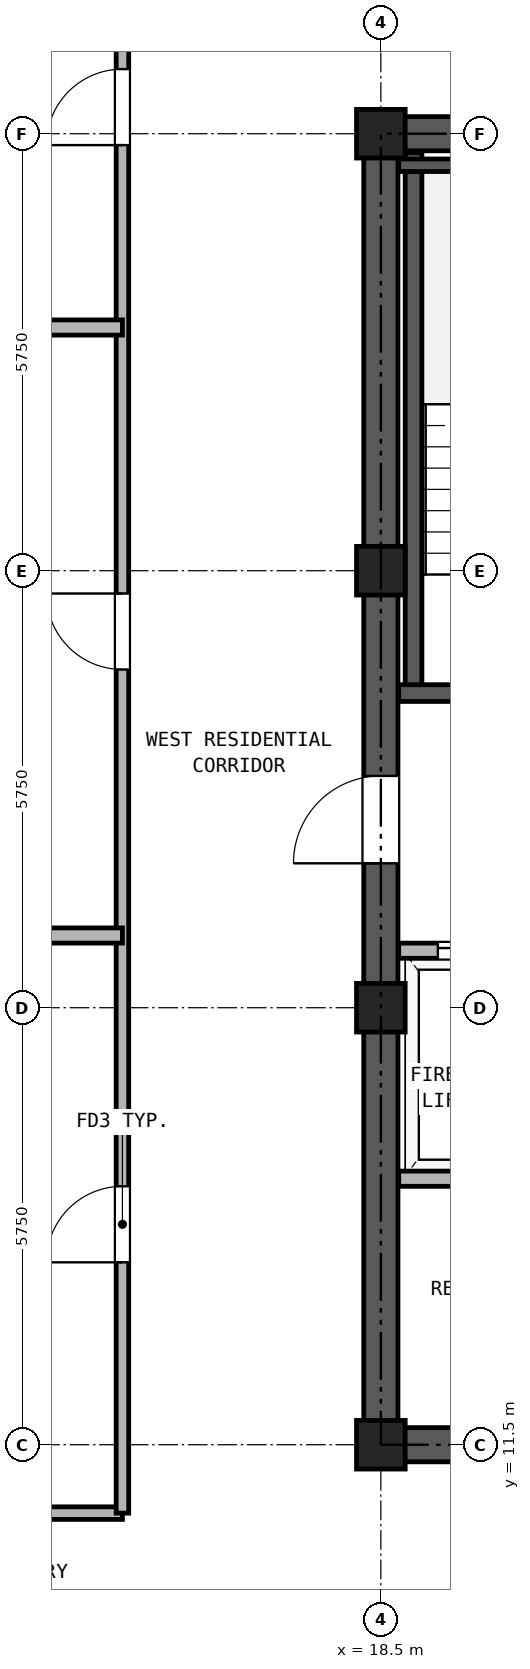
"""IFC4 building model, lengths in metres.
Left out: names, types, materials, properties, quantities, classifications, styles, units other than length and angle.
Written with IfcOpenShell. Run it as: python <this file> out.ifc"""

import sys

from ifc_helpers import new_model, si_unit, direction, frame, frame_2d, origin, origin_2d, place, context, subcontext, project, spatial, rectangle, hollow_rectangle, extrude, source, transform, mapped, element, fill, save


model = new_model("IFC4")
c1 = context("Model", 3, precision=1e-05, world=origin(), true_north=direction((0.0, 1.0)))
c2 = subcontext(c1, "Body", "Model", "MODEL_VIEW")
j1 = project(units=[si_unit("LENGTHUNIT", "METRE"), si_unit("PLANEANGLEUNIT", "RADIAN")], contexts=[c1])
p1 = place(None, origin())
s1 = spatial("IfcSite", under=j1, at=p1, CompositionType="ELEMENT")
p2 = place(p1, origin())
s2 = spatial("IfcBuilding", under=s1, at=p2, CompositionType="ELEMENT")
p3 = place(p2, frame((0.0, 0.0, 196.4)))
s3 = spatial("IfcBuildingStorey", under=s2, at=p3, CompositionType="ELEMENT", Elevation=196.4)
m1 = source(origin(), c2, "Body", "SweptSolid", [
    extrude(hollow_rectangle(XDim=0.64, YDim=0.64, WallThickness=0.035, at=origin_2d()), origin(), (0.0, 0.0, 1.0), 2.95),
])
for number, where, z_axis, x_axis in (
    (1, (18.5, 11.5, 0.0), (0.0, 0.0, 1.0), (1.0, 0.0, 0.0)),
    (2, (18.5, 17.25, 0.0), (0.0, 0.0, 1.0), (1.0, 0.0, 0.0)),
    (3, (18.5, 23.0, 0.0), (0.0, 0.0, 1.0), (1.0, 0.0, 0.0)),
    (4, (18.5, 28.75, 0.0), (0.0, 0.0, 1.0), (1.0, 0.0, 0.0)),
):
    element("IfcColumn", number, at=place(p3, frame(where, z_axis=z_axis, x_axis=x_axis)), inside=s3, PredefinedType="COLUMN", context=c2, shape_type="MappedRepresentation", body=[
        mapped(m1, transform((0.0, 0.0, 0.0), x_axis=(1.0, 0.0, 0.0), y_axis=(0.0, 1.0, 0.0), z_axis=(0.0, 0.0, 1.0), scale=1.0)),
    ])
p4 = place(p3, frame((18.275, 11.5, 0.0), z_axis=(0.0, 0.0, 1.0), x_axis=(1.0, 0.0, 0.0)))
e5 = element("IfcWall", 5, at=p4, inside=s3, PredefinedType="SHEAR", context=c2, shape_type="SweptSolid", body=[
    extrude(rectangle(XDim=10.45, YDim=0.45, at=frame_2d((5.225, 0.0))), origin(), (0.0, 0.0, 1.0), 2.95),
])
p5 = place(p4, frame((1.825, 0.0, 0.0)))
e6 = element("IfcOpeningElement", 6, at=p5, cuts=e5, PredefinedType="OPENING", context=c2, shape_type="SweptSolid", body=[
    extrude(rectangle(XDim=0.95, YDim=2.15, at=frame_2d((0.475, 1.075))), frame((0.0, 0.235, 0.0), z_axis=(0.0, -1.0, 0.0), x_axis=(1.0, 0.0, 0.0)), (0.0, 0.0, 1.0), 0.47),
])
p6 = place(p4, frame((5.325, 0.0, 0.0)))
e7 = element("IfcOpeningElement", 7, at=p6, cuts=e5, PredefinedType="OPENING", context=c2, shape_type="SweptSolid", body=[
    extrude(rectangle(XDim=0.95, YDim=2.15, at=frame_2d((0.475, 1.075))), frame((0.0, 0.235, 0.0), z_axis=(0.0, -1.0, 0.0), x_axis=(1.0, 0.0, 0.0)), (0.0, 0.0, 1.0), 0.47),
])
p7 = place(p4, frame((8.225, 0.0, 0.0)))
e8 = element("IfcOpeningElement", 8, at=p7, cuts=e5, PredefinedType="OPENING", context=c2, shape_type="SweptSolid", body=[
    extrude(rectangle(XDim=1.1, YDim=2.25, at=frame_2d((0.55, 1.125))), frame((0.0, 0.235, 0.0), z_axis=(0.0, -1.0, 0.0), x_axis=(1.0, 0.0, 0.0)), (0.0, 0.0, 1.0), 0.47),
])
p8 = place(p3, frame((18.275, 28.75, 0.0), z_axis=(0.0, 0.0, 1.0), x_axis=(1.0, 0.0, 0.0)))
e9 = element("IfcWall", 9, at=p8, inside=s3, PredefinedType="SHEAR", context=c2, shape_type="SweptSolid", body=[
    extrude(rectangle(XDim=10.45, YDim=0.45, at=frame_2d((5.225, 0.0))), origin(), (0.0, 0.0, 1.0), 2.95),
])
p9 = place(p8, frame((4.105, 0.0, 0.0)))
e10 = element("IfcOpeningElement", 10, at=p9, cuts=e9, PredefinedType="OPENING", context=c2, shape_type="SweptSolid", body=[
    extrude(rectangle(XDim=0.9, YDim=2.05, at=frame_2d((0.45, 1.025))), frame((0.0, 0.235, 0.0), z_axis=(0.0, -1.0, 0.0), x_axis=(1.0, 0.0, 0.0)), (0.0, 0.0, 1.0), 0.47),
])
p10 = place(p8, frame((5.645, 0.0, 0.0)))
e11 = element("IfcOpeningElement", 11, at=p10, cuts=e9, PredefinedType="OPENING", context=c2, shape_type="SweptSolid", body=[
    extrude(rectangle(XDim=0.9, YDim=2.05, at=frame_2d((0.45, 1.025))), frame((0.0, 0.235, 0.0), z_axis=(0.0, -1.0, 0.0), x_axis=(1.0, 0.0, 0.0)), (0.0, 0.0, 1.0), 0.47),
])
p11 = place(p3, frame((18.5, 11.725, 0.0), z_axis=(0.0, 0.0, 1.0), x_axis=(0.0, 1.0, 0.0)))
e12 = element("IfcWall", 12, at=p11, inside=s3, PredefinedType="SHEAR", context=c2, shape_type="SweptSolid", body=[
    extrude(rectangle(XDim=16.8, YDim=0.45, at=frame_2d((8.4, 0.0))), origin(), (0.0, 0.0, 1.0), 2.95),
])
p12 = place(p11, frame((7.425, 0.0, 0.0)))
e13 = element("IfcOpeningElement", 13, at=p12, cuts=e12, PredefinedType="OPENING", context=c2, shape_type="SweptSolid", body=[
    extrude(rectangle(XDim=1.15, YDim=2.2, at=frame_2d((0.575, 1.1))), frame((0.0, 0.235, 0.0), z_axis=(0.0, -1.0, 0.0), x_axis=(1.0, 0.0, 0.0)), (0.0, 0.0, 1.0), 0.47),
])
p13 = place(p3, frame((18.93, 21.39, 0.0), z_axis=(0.0, 0.0, 1.0), x_axis=(0.0, 1.0, 0.0)))
e14 = element("IfcWall", 14, at=p13, inside=s3, PredefinedType="SOLIDWALL", context=c2, shape_type="SweptSolid", body=[
    extrude(rectangle(XDim=7.11, YDim=0.22, at=frame_2d((3.555, 0.0))), origin(), (0.0, 0.0, 1.0), 2.95),
])
p14 = place(p3, frame((18.735, 28.335, 0.0), z_axis=(0.0, 0.0, 1.0), x_axis=(1.0, 0.0, 0.0)))
e15 = element("IfcWall", 15, at=p14, inside=s3, PredefinedType="PARTITIONING", context=c2, shape_type="SweptSolid", body=[
    extrude(rectangle(XDim=3.375, YDim=0.165, at=frame_2d((1.688, 0.0))), origin(), (0.0, 0.0, 1.0), 2.95),
])
p15 = place(p3, frame((18.735, 21.39, 0.0), z_axis=(0.0, 0.0, 1.0), x_axis=(1.0, 0.0, 0.0)))
e16 = element("IfcWall", 16, at=p15, inside=s3, PredefinedType="SOLIDWALL", context=c2, shape_type="SweptSolid", body=[
    extrude(rectangle(XDim=6.395, YDim=0.22, at=frame_2d((3.197, 0.0))), origin(), (0.0, 0.0, 1.0), 2.95),
])
p16 = place(p15, frame((1.115, 0.0, 0.0)))
e17 = element("IfcOpeningElement", 17, at=p16, cuts=e16, PredefinedType="OPENING", context=c2, shape_type="SweptSolid", body=[
    extrude(rectangle(XDim=1.15, YDim=2.2, at=frame_2d((0.575, 1.1))), frame((0.0, 0.12, 0.0), z_axis=(0.0, -1.0, 0.0), x_axis=(1.0, 0.0, 0.0)), (0.0, 0.0, 1.0), 0.24),
])
p17 = place(p15, frame((4.845, 0.0, 0.0)))
e18 = element("IfcOpeningElement", 18, at=p17, cuts=e16, PredefinedType="OPENING", context=c2, shape_type="SweptSolid", body=[
    extrude(rectangle(XDim=1.1, YDim=2.25, at=frame_2d((0.55, 1.125))), frame((0.0, 0.12, 0.0), z_axis=(0.0, -1.0, 0.0), x_axis=(1.0, 0.0, 0.0)), (0.0, 0.0, 1.0), 0.24),
])
p18 = place(p3, frame((18.735, 18.0, 0.0), z_axis=(0.0, 0.0, 1.0), x_axis=(1.0, 0.0, 0.0)))
e19 = element("IfcWall", 19, at=p18, inside=s3, PredefinedType="PARTITIONING", context=c2, shape_type="SweptSolid", body=[
    extrude(rectangle(XDim=9.53, YDim=0.2, at=frame_2d((4.765, 0.0))), origin(), (0.0, 0.0, 1.0), 2.95),
])
p19 = place(p18, frame((0.515, 0.0, 0.0)))
e20 = element("IfcOpeningElement", 20, at=p19, cuts=e19, PredefinedType="OPENING", context=c2, shape_type="SweptSolid", body=[
    extrude(rectangle(XDim=1.3, YDim=2.3, at=frame_2d((0.65, 1.15))), frame((0.0, 0.11, 0.0), z_axis=(0.0, -1.0, 0.0), x_axis=(1.0, 0.0, 0.0)), (0.0, 0.0, 1.0), 0.22),
])
p20 = place(p18, frame((2.615, 0.0, 0.0)))
e21 = element("IfcOpeningElement", 21, at=p20, cuts=e19, PredefinedType="OPENING", context=c2, shape_type="SweptSolid", body=[
    extrude(rectangle(XDim=1.3, YDim=2.3, at=frame_2d((0.65, 1.15))), frame((0.0, 0.11, 0.0), z_axis=(0.0, -1.0, 0.0), x_axis=(1.0, 0.0, 0.0)), (0.0, 0.0, 1.0), 0.22),
])
p21 = place(p18, frame((5.035, 0.0, 0.0)))
e22 = element("IfcOpeningElement", 22, at=p21, cuts=e19, PredefinedType="OPENING", context=c2, shape_type="SweptSolid", body=[
    extrude(rectangle(XDim=0.9, YDim=2.05, at=frame_2d((0.45, 1.025))), frame((0.0, 0.11, 0.0), z_axis=(0.0, -1.0, 0.0), x_axis=(1.0, 0.0, 0.0)), (0.0, 0.0, 1.0), 0.22),
])
p22 = place(p18, frame((8.165, 0.0, 0.0)))
e23 = element("IfcOpeningElement", 23, at=p22, cuts=e19, PredefinedType="OPENING", context=c2, shape_type="SweptSolid", body=[
    extrude(rectangle(XDim=0.9, YDim=2.05, at=frame_2d((0.45, 1.025))), frame((0.0, 0.11, 0.0), z_axis=(0.0, -1.0, 0.0), x_axis=(1.0, 0.0, 0.0)), (0.0, 0.0, 1.0), 0.22),
])
p23 = place(p3, frame((18.735, 15.0, 0.0), z_axis=(0.0, 0.0, 1.0), x_axis=(1.0, 0.0, 0.0)))
e24 = element("IfcWall", 24, at=p23, inside=s3, PredefinedType="PARTITIONING", context=c2, shape_type="SweptSolid", body=[
    extrude(rectangle(XDim=9.53, YDim=0.2, at=frame_2d((4.765, 0.0))), origin(), (0.0, 0.0, 1.0), 2.95),
])
p24 = place(p3, frame((7.6, 10.6, 0.0), z_axis=(0.0, 0.0, 1.0), x_axis=(1.0, 0.0, 0.0)))
e25 = element("IfcWall", 25, at=p24, inside=s3, PredefinedType="PARTITIONING", context=c2, shape_type="SweptSolid", body=[
    extrude(rectangle(XDim=7.5, YDim=0.165, at=frame_2d((3.75, 0.0))), origin(), (0.0, 0.0, 1.0), 2.95),
])
p25 = place(p3, frame((15.1, 10.6, 0.0), z_axis=(0.0, 0.0, 1.0), x_axis=(0.0, 1.0, 0.0)))
e26 = element("IfcWall", 26, at=p25, inside=s3, PredefinedType="PARTITIONING", context=c2, shape_type="SweptSolid", body=[
    extrude(rectangle(XDim=24.54, YDim=0.165, at=frame_2d((12.27, 0.0))), origin(), (0.0, 0.0, 1.0), 2.95),
])
p26 = place(p25, frame((3.3, 0.0, 0.0)))
e27 = element("IfcOpeningElement", 27, at=p26, cuts=e26, PredefinedType="OPENING", context=c2, shape_type="SweptSolid", body=[
    extrude(rectangle(XDim=1.0, YDim=2.15, at=frame_2d((0.5, 1.075))), frame((0.0, 0.093, 0.0), z_axis=(0.0, -1.0, 0.0), x_axis=(1.0, 0.0, 0.0)), (0.0, 0.0, 1.0), 0.185),
])
p27 = place(p25, frame((11.1, 0.0, 0.0)))
e28 = element("IfcOpeningElement", 28, at=p27, cuts=e26, PredefinedType="OPENING", context=c2, shape_type="SweptSolid", body=[
    extrude(rectangle(XDim=1.0, YDim=2.15, at=frame_2d((0.5, 1.075))), frame((0.0, 0.093, 0.0), z_axis=(0.0, -1.0, 0.0), x_axis=(1.0, 0.0, 0.0)), (0.0, 0.0, 1.0), 0.185),
])
p28 = place(p25, frame((18.0, 0.0, 0.0)))
e29 = element("IfcOpeningElement", 29, at=p28, cuts=e26, PredefinedType="OPENING", context=c2, shape_type="SweptSolid", body=[
    extrude(rectangle(XDim=1.0, YDim=2.15, at=frame_2d((0.5, 1.075))), frame((0.0, 0.093, 0.0), z_axis=(0.0, -1.0, 0.0), x_axis=(1.0, 0.0, 0.0)), (0.0, 0.0, 1.0), 0.185),
])
for number, where, z_axis, x_axis in (
    (30, (0.16, 18.2, 0.0), (0.0, 0.0, 1.0), (1.0, 0.0, 0.0)),
    (31, (0.16, 26.2, 0.0), (0.0, 0.0, 1.0), (1.0, 0.0, 0.0)),
):
    element("IfcWall", number, at=place(p3, frame(where, z_axis=z_axis, x_axis=x_axis)), inside=s3, PredefinedType="PARTITIONING", context=c2, shape_type="SweptSolid", body=[
        extrude(rectangle(XDim=14.94, YDim=0.2, at=frame_2d((7.47, 0.0))), origin(), (0.0, 0.0, 1.0), 2.95),
    ])
p29 = place(p19, origin())
e32 = element("IfcDoor", 32, at=p29, inside=s3, OperationType="DOUBLE_DOOR_SLIDING", PredefinedType="DOOR", context=c2, shape_type="SweptSolid", body=[
    extrude(rectangle(XDim=1.3, YDim=2.3, at=frame_2d((0.65, 1.15))), frame((0.0, 0.025, 0.0), z_axis=(0.0, -1.0, 0.0), x_axis=(1.0, 0.0, 0.0)), (0.0, 0.0, 1.0), 0.05),
])
fill(e20, e32)
p30 = place(p12, frame((1.15, 0.0, 0.0), z_axis=(0.0, 0.0, 1.0), x_axis=(-1.0, 0.0, 0.0)))
e33 = element("IfcDoor", 33, at=p30, inside=s3, OperationType="SINGLE_SWING_LEFT", PredefinedType="DOOR", context=c2, shape_type="SweptSolid", body=[
    extrude(rectangle(XDim=1.15, YDim=2.2, at=frame_2d((0.575, 1.1))), frame((0.0, 0.025, 0.0), z_axis=(0.0, -1.0, 0.0), x_axis=(1.0, 0.0, 0.0)), (0.0, 0.0, 1.0), 0.05),
])
fill(e13, e33)
p31 = place(p26, origin())
e34 = element("IfcDoor", 34, at=p31, inside=s3, OperationType="SINGLE_SWING_LEFT", PredefinedType="DOOR", context=c2, shape_type="SweptSolid", body=[
    extrude(rectangle(XDim=1.0, YDim=2.15, at=frame_2d((0.5, 1.075))), frame((0.0, 0.025, 0.0), z_axis=(0.0, -1.0, 0.0), x_axis=(1.0, 0.0, 0.0)), (0.0, 0.0, 1.0), 0.05),
])
fill(e27, e34)
p32 = place(p27, origin())
e35 = element("IfcDoor", 35, at=p32, inside=s3, OperationType="SINGLE_SWING_RIGHT", PredefinedType="DOOR", context=c2, shape_type="SweptSolid", body=[
    extrude(rectangle(XDim=1.0, YDim=2.15, at=frame_2d((0.5, 1.075))), frame((0.0, 0.025, 0.0), z_axis=(0.0, -1.0, 0.0), x_axis=(1.0, 0.0, 0.0)), (0.0, 0.0, 1.0), 0.05),
])
fill(e28, e35)
p33 = place(p28, origin())
e36 = element("IfcDoor", 36, at=p33, inside=s3, OperationType="SINGLE_SWING_LEFT", PredefinedType="DOOR", context=c2, shape_type="SweptSolid", body=[
    extrude(rectangle(XDim=1.0, YDim=2.15, at=frame_2d((0.5, 1.075))), frame((0.0, 0.025, 0.0), z_axis=(0.0, -1.0, 0.0), x_axis=(1.0, 0.0, 0.0)), (0.0, 0.0, 1.0), 0.05),
])
fill(e29, e36)
save(model, sys.argv[1])
